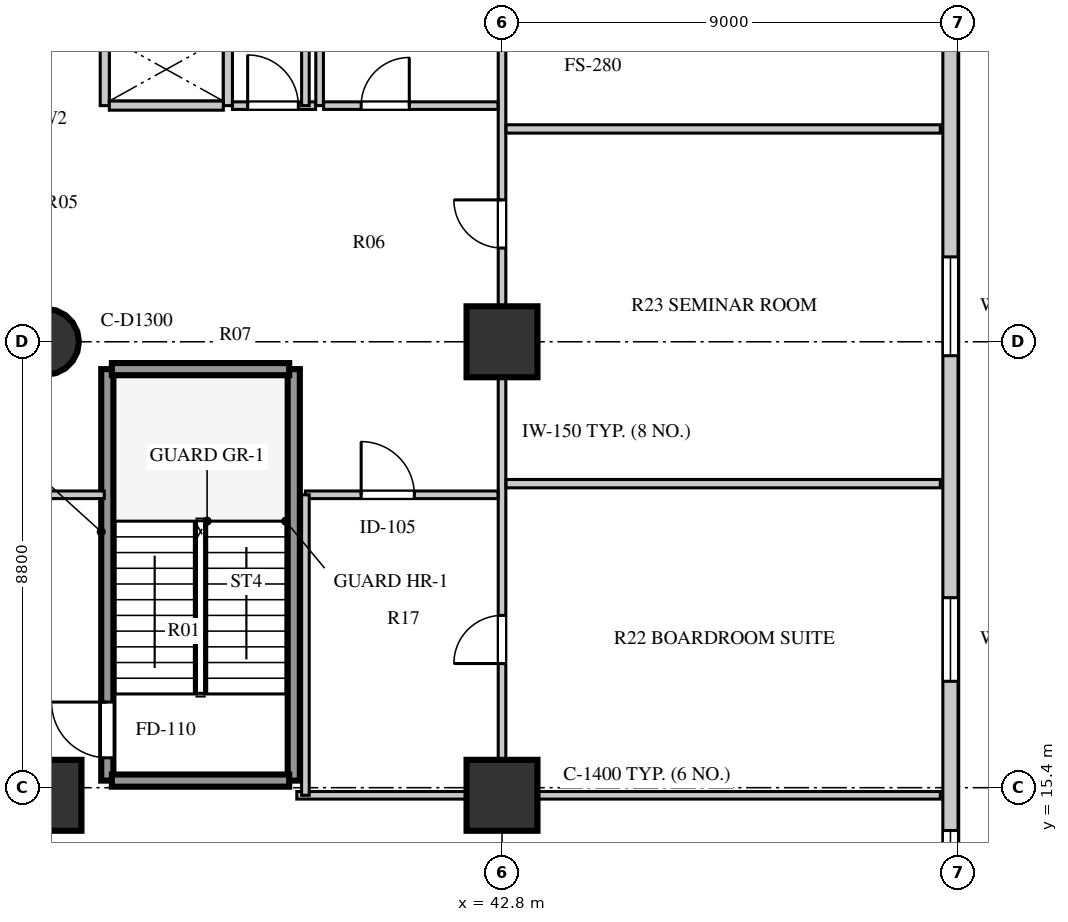
"""IFC4 building model, lengths in metres.
Left out: names, types, materials, properties, quantities, classifications, styles, units other than length and angle.
Written with IfcOpenShell. Run it as: python <this file> out.ifc"""

import sys

from ifc_helpers import new_model, si_unit, direction, frame, frame_2d, origin, origin_2d, place, context, subcontext, project, spatial, rectangle, circle, extrude, element, fill, save


model = new_model("IFC4")
c1 = context("Model", 3, precision=1e-05, world=origin(), true_north=direction((0.0, 1.0)))
c2 = subcontext(c1, "Body", "Model", "MODEL_VIEW")
j1 = project(units=[si_unit("LENGTHUNIT", "METRE"), si_unit("PLANEANGLEUNIT", "RADIAN")], contexts=[c1])
p1 = place(None, origin())
s1 = spatial("IfcSite", under=j1, at=p1, CompositionType="ELEMENT")
p2 = place(p1, origin())
s2 = spatial("IfcBuilding", under=s1, at=p2, CompositionType="ELEMENT")
p3 = place(p2, frame((0.0, 0.0, 17.0)))
s3 = spatial("IfcBuildingStorey", under=s2, at=p3, CompositionType="ELEMENT", Elevation=17.0)
p4 = place(p3, frame((33.8, 15.25, 0.0), z_axis=(0.0, 0.0, 1.0), x_axis=(1.0, 0.0, 0.0)))
e1 = element("IfcColumn", 1, at=p4, inside=s3, PredefinedType="COLUMN", context=c2, shape_type="SweptSolid", body=[
    extrude(rectangle(XDim=1.4, YDim=1.4, at=origin_2d()), origin(), (0.0, 0.0, 1.0), 4.22),
])
p5 = place(p3, frame((33.8, 24.2, 0.0), z_axis=(0.0, 0.0, 1.0), x_axis=(1.0, 0.0, 0.0)))
e2 = element("IfcColumn", 2, at=p5, inside=s3, PredefinedType="COLUMN", context=c2, shape_type="SweptSolid", body=[
    extrude(circle(Radius=0.65, at=origin_2d()), origin(), (0.0, 0.0, 1.0), 4.22),
])
for number, where, z_axis, x_axis in (
    (3, (42.8, 15.25, 0.0), (0.0, 0.0, 1.0), (1.0, 0.0, 0.0)),
    (4, (42.8, 24.2, 0.0), (0.0, 0.0, 1.0), (1.0, 0.0, 0.0)),
):
    element("IfcColumn", number, at=place(p3, frame(where, z_axis=z_axis, x_axis=x_axis)), inside=s3, PredefinedType="COLUMN", context=c2, shape_type="SweptSolid", body=[
        extrude(rectangle(XDim=1.4, YDim=1.4, at=origin_2d()), origin(), (0.0, 0.0, 1.0), 4.22),
    ])
p6 = place(p3, frame((51.65, 12.4, 0.0), z_axis=(0.0, 0.0, 1.0), x_axis=(0.0, 1.0, 0.0)))
e5 = element("IfcWall", 5, at=p6, inside=s3, PredefinedType="STANDARD", context=c2, shape_type="SweptSolid", body=[
    extrude(rectangle(XDim=32.4, YDim=0.3, at=frame_2d((16.2, 0.0))), origin(), (0.0, 0.0, 1.0), 4.22),
])
p7 = place(p6, frame((0.805, 0.0, 0.8)))
e6 = element("IfcOpeningElement", 6, at=p7, cuts=e5, PredefinedType="OPENING", context=c2, shape_type="SweptSolid", body=[
    extrude(rectangle(XDim=1.35, YDim=1.9, at=frame_2d((0.675, 0.95))), frame((0.0, 0.16, 0.0), z_axis=(0.0, -1.0, 0.0), x_axis=(1.0, 0.0, 0.0)), (0.0, 0.0, 1.0), 0.32),
])
p8 = place(p6, frame((5.1, 0.0, 0.8)))
e7 = element("IfcOpeningElement", 7, at=p8, cuts=e5, PredefinedType="OPENING", context=c2, shape_type="SweptSolid", body=[
    extrude(rectangle(XDim=1.65, YDim=1.95, at=frame_2d((0.825, 0.975))), frame((0.0, 0.16, 0.0), z_axis=(0.0, -1.0, 0.0), x_axis=(1.0, 0.0, 0.0)), (0.0, 0.0, 1.0), 0.32),
])
p9 = place(p6, frame((11.525, 0.0, 0.8)))
e8 = element("IfcOpeningElement", 8, at=p9, cuts=e5, PredefinedType="OPENING", context=c2, shape_type="SweptSolid", body=[
    extrude(rectangle(XDim=1.95, YDim=2.0, at=frame_2d((0.975, 1.0))), frame((0.0, 0.16, 0.0), z_axis=(0.0, -1.0, 0.0), x_axis=(1.0, 0.0, 0.0)), (0.0, 0.0, 1.0), 0.32),
])
p10 = place(p6, frame((18.225, 0.0, 0.8)))
e9 = element("IfcOpeningElement", 9, at=p10, cuts=e5, PredefinedType="OPENING", context=c2, shape_type="SweptSolid", body=[
    extrude(rectangle(XDim=2.25, YDim=2.0, at=frame_2d((1.125, 1.0))), frame((0.0, 0.16, 0.0), z_axis=(0.0, -1.0, 0.0), x_axis=(1.0, 0.0, 0.0)), (0.0, 0.0, 1.0), 0.32),
])
p11 = place(p6, frame((23.55, 0.0, 0.8)))
e10 = element("IfcOpeningElement", 10, at=p11, cuts=e5, PredefinedType="OPENING", context=c2, shape_type="SweptSolid", body=[
    extrude(rectangle(XDim=1.8, YDim=2.0, at=frame_2d((0.9, 1.0))), frame((0.0, 0.16, 0.0), z_axis=(0.0, -1.0, 0.0), x_axis=(1.0, 0.0, 0.0)), (0.0, 0.0, 1.0), 0.32),
])
p12 = place(p6, frame((27.125, 0.0, 0.8)))
e11 = element("IfcOpeningElement", 11, at=p12, cuts=e5, PredefinedType="OPENING", context=c2, shape_type="SweptSolid", body=[
    extrude(rectangle(XDim=1.5, YDim=2.0, at=frame_2d((0.75, 1.0))), frame((0.0, 0.16, 0.0), z_axis=(0.0, -1.0, 0.0), x_axis=(1.0, 0.0, 0.0)), (0.0, 0.0, 1.0), 0.32),
])
p13 = place(p6, frame((30.32, 0.0, 0.8)))
e12 = element("IfcOpeningElement", 12, at=p13, cuts=e5, PredefinedType="OPENING", context=c2, shape_type="SweptSolid", body=[
    extrude(rectangle(XDim=1.2, YDim=1.75, at=frame_2d((0.6, 0.875))), frame((0.0, 0.16, 0.0), z_axis=(0.0, -1.0, 0.0), x_axis=(1.0, 0.0, 0.0)), (0.0, 0.0, 1.0), 0.32),
])
p14 = place(p3, frame((34.96, 28.86, 0.0), z_axis=(0.0, 0.0, 1.0), x_axis=(0.0, 1.0, 0.0)))
e13 = element("IfcWall", 13, at=p14, inside=s3, PredefinedType="SOLIDWALL", context=c2, shape_type="SweptSolid", body=[
    extrude(rectangle(XDim=4.22, YDim=0.18, at=frame_2d((2.11, 0.0))), origin(), (0.0, 0.0, 1.0), 4.22),
])
p15 = place(p3, frame((37.39, 28.86, 0.0), z_axis=(0.0, 0.0, 1.0), x_axis=(0.0, 1.0, 0.0)))
e14 = element("IfcWall", 14, at=p15, inside=s3, PredefinedType="SOLIDWALL", context=c2, shape_type="SweptSolid", body=[
    extrude(rectangle(XDim=4.22, YDim=0.18, at=frame_2d((2.11, 0.0))), origin(), (0.0, 0.0, 1.0), 4.22),
])
p16 = place(p15, frame((2.1, 0.0, 0.0)))
e15 = element("IfcOpeningElement", 15, at=p16, cuts=e14, PredefinedType="OPENING", context=c2, shape_type="SweptSolid", body=[
    extrude(rectangle(XDim=1.2, YDim=2.12, at=frame_2d((0.6, 1.06))), frame((0.0, 0.1, 0.0), z_axis=(0.0, -1.0, 0.0), x_axis=(1.0, 0.0, 0.0)), (0.0, 0.0, 1.0), 0.2),
])
p17 = place(p3, frame((35.05, 28.86, 0.0), z_axis=(0.0, 0.0, 1.0), x_axis=(1.0, 0.0, 0.0)))
e16 = element("IfcWall", 16, at=p17, inside=s3, PredefinedType="SOLIDWALL", context=c2, shape_type="SweptSolid", body=[
    extrude(rectangle(XDim=2.25, YDim=0.18, at=frame_2d((1.125, 0.0))), origin(), (0.0, 0.0, 1.0), 4.22),
])
p18 = place(p3, frame((39.2, 28.86, 0.0), z_axis=(0.0, 0.0, 1.0), x_axis=(0.0, 1.0, 0.0)))
e17 = element("IfcWall", 17, at=p18, inside=s3, PredefinedType="PARTITIONING", context=c2, shape_type="SweptSolid", body=[
    extrude(rectangle(XDim=4.22, YDim=0.15, at=frame_2d((2.11, 0.0))), origin(), (0.0, 0.0, 1.0), 4.22),
])
p19 = place(p3, frame((37.48, 28.86, 0.0), z_axis=(0.0, 0.0, 1.0), x_axis=(1.0, 0.0, 0.0)))
e18 = element("IfcWall", 18, at=p19, inside=s3, PredefinedType="PARTITIONING", context=c2, shape_type="SweptSolid", body=[
    extrude(rectangle(XDim=1.64, YDim=0.15, at=frame_2d((0.82, 0.0))), origin(), (0.0, 0.0, 1.0), 4.22),
])
p20 = place(p19, frame((0.3, 0.0, 0.0)))
e19 = element("IfcOpeningElement", 19, at=p20, cuts=e18, PredefinedType="OPENING", context=c2, shape_type="SweptSolid", body=[
    extrude(rectangle(XDim=1.0, YDim=2.1, at=frame_2d((0.5, 1.05))), frame((0.0, 0.085, 0.0), z_axis=(0.0, -1.0, 0.0), x_axis=(1.0, 0.0, 0.0)), (0.0, 0.0, 1.0), 0.17),
])
p21 = place(p3, frame((35.01, 15.54, 0.0), z_axis=(0.0, 0.0, 1.0), x_axis=(0.0, 1.0, 0.0)))
e20 = element("IfcWall", 20, at=p21, inside=s3, PredefinedType="SHEAR", context=c2, shape_type="SweptSolid", body=[
    extrude(rectangle(XDim=8.12, YDim=0.24, at=frame_2d((4.06, 0.0))), origin(), (0.0, 0.0, 1.0), 4.5),
])
p22 = place(p21, frame((0.45, 0.0, 0.0)))
e21 = element("IfcOpeningElement", 21, at=p22, cuts=e20, PredefinedType="OPENING", context=c2, shape_type="SweptSolid", body=[
    extrude(rectangle(XDim=1.1, YDim=2.1, at=frame_2d((0.55, 1.05))), frame((0.0, 0.13, 0.0), z_axis=(0.0, -1.0, 0.0), x_axis=(1.0, 0.0, 0.0)), (0.0, 0.0, 1.0), 0.26),
])
p23 = place(p3, frame((38.69, 15.54, 0.0), z_axis=(0.0, 0.0, 1.0), x_axis=(0.0, 1.0, 0.0)))
e22 = element("IfcWall", 22, at=p23, inside=s3, PredefinedType="SHEAR", context=c2, shape_type="SweptSolid", body=[
    extrude(rectangle(XDim=8.12, YDim=0.24, at=frame_2d((4.06, 0.0))), origin(), (0.0, 0.0, 1.0), 4.5),
])
for number, where, z_axis, x_axis in (
    (23, (35.1, 15.54, 0.0), (0.0, 0.0, 1.0), (1.0, 0.0, 0.0)),
    (24, (35.1, 23.66, 0.0), (0.0, 0.0, 1.0), (1.0, 0.0, 0.0)),
):
    element("IfcWall", number, at=place(p3, frame(where, z_axis=z_axis, x_axis=x_axis)), inside=s3, PredefinedType="SHEAR", context=c2, shape_type="SweptSolid", body=[
        extrude(rectangle(XDim=3.5, YDim=0.24, at=frame_2d((1.75, 0.0))), origin(), (0.0, 0.0, 1.0), 4.5),
    ])
p24 = place(p3, frame((27.5, 21.18, 0.0), z_axis=(0.0, 0.0, 1.0), x_axis=(1.0, 0.0, 0.0)))
e25 = element("IfcWall", 25, at=p24, inside=s3, PredefinedType="PARTITIONING", context=c2, shape_type="SweptSolid", body=[
    extrude(rectangle(XDim=7.45, YDim=0.15, at=frame_2d((3.725, 0.0))), origin(), (0.0, 0.0, 1.0), 3.82),
])
p25 = place(p24, frame((5.1, 0.0, 0.0)))
e26 = element("IfcOpeningElement", 26, at=p25, cuts=e25, PredefinedType="OPENING", context=c2, shape_type="SweptSolid", body=[
    extrude(rectangle(XDim=0.95, YDim=2.08, at=frame_2d((0.475, 1.04))), frame((0.0, 0.085, 0.0), z_axis=(0.0, -1.0, 0.0), x_axis=(1.0, 0.0, 0.0)), (0.0, 0.0, 1.0), 0.17),
])
p26 = place(p24, frame((2.3, 0.0, 0.0)))
e27 = element("IfcOpeningElement", 27, at=p26, cuts=e25, PredefinedType="OPENING", context=c2, shape_type="SweptSolid", body=[
    extrude(rectangle(XDim=1.35, YDim=2.1, at=frame_2d((0.675, 1.05))), frame((0.0, 0.085, 0.0), z_axis=(0.0, -1.0, 0.0), x_axis=(1.0, 0.0, 0.0)), (0.0, 0.0, 1.0), 0.17),
])
p27 = place(p3, frame((42.8, 15.25, 0.0), z_axis=(0.0, 0.0, 1.0), x_axis=(0.0, 1.0, 0.0)))
e28 = element("IfcWall", 28, at=p27, inside=s3, PredefinedType="PARTITIONING", context=c2, shape_type="SweptSolid", body=[
    extrude(rectangle(XDim=26.7, YDim=0.15, at=frame_2d((13.35, 0.0))), origin(), (0.0, 0.0, 1.0), 3.42),
])
p28 = place(p27, frame((2.6, 0.0, 0.0)))
e29 = element("IfcOpeningElement", 29, at=p28, cuts=e28, PredefinedType="OPENING", context=c2, shape_type="SweptSolid", body=[
    extrude(rectangle(XDim=0.95, YDim=2.08, at=frame_2d((0.475, 1.04))), frame((0.0, 0.085, 0.0), z_axis=(0.0, -1.0, 0.0), x_axis=(1.0, 0.0, 0.0)), (0.0, 0.0, 1.0), 0.17),
])
p29 = place(p27, frame((10.8, 0.0, 0.0)))
e30 = element("IfcOpeningElement", 30, at=p29, cuts=e28, PredefinedType="OPENING", context=c2, shape_type="SweptSolid", body=[
    extrude(rectangle(XDim=0.95, YDim=2.08, at=frame_2d((0.475, 1.04))), frame((0.0, 0.085, 0.0), z_axis=(0.0, -1.0, 0.0), x_axis=(1.0, 0.0, 0.0)), (0.0, 0.0, 1.0), 0.17),
])
p30 = place(p27, frame((15.7, 0.0, 0.0)))
e31 = element("IfcOpeningElement", 31, at=p30, cuts=e28, PredefinedType="OPENING", context=c2, shape_type="SweptSolid", body=[
    extrude(rectangle(XDim=1.1, YDim=2.12, at=frame_2d((0.55, 1.06))), frame((0.0, 0.085, 0.0), z_axis=(0.0, -1.0, 0.0), x_axis=(1.0, 0.0, 0.0)), (0.0, 0.0, 1.0), 0.17),
])
p31 = place(p27, frame((20.6, 0.0, 0.0)))
e32 = element("IfcOpeningElement", 32, at=p31, cuts=e28, PredefinedType="OPENING", context=c2, shape_type="SweptSolid", body=[
    extrude(rectangle(XDim=0.9, YDim=2.05, at=frame_2d((0.45, 1.025))), frame((0.0, 0.085, 0.0), z_axis=(0.0, -1.0, 0.0), x_axis=(1.0, 0.0, 0.0)), (0.0, 0.0, 1.0), 0.17),
])
p32 = place(p27, frame((24.1, 0.0, 0.0)))
e33 = element("IfcOpeningElement", 33, at=p32, cuts=e28, PredefinedType="OPENING", context=c2, shape_type="SweptSolid", body=[
    extrude(rectangle(XDim=0.95, YDim=2.05, at=frame_2d((0.475, 1.025))), frame((0.0, 0.085, 0.0), z_axis=(0.0, -1.0, 0.0), x_axis=(1.0, 0.0, 0.0)), (0.0, 0.0, 1.0), 0.17),
])
p33 = place(p3, frame((38.75, 15.25, 0.0), z_axis=(0.0, 0.0, 1.0), x_axis=(1.0, 0.0, 0.0)))
e34 = element("IfcWall", 34, at=p33, inside=s3, PredefinedType="PARTITIONING", context=c2, shape_type="SweptSolid", body=[
    extrude(rectangle(XDim=12.7, YDim=0.15, at=frame_2d((6.35, 0.0))), origin(), (0.0, 0.0, 1.0), 3.42),
])
p34 = place(p3, frame((38.92, 21.18, 0.0), z_axis=(0.0, 0.0, 1.0), x_axis=(1.0, 0.0, 0.0)))
e35 = element("IfcWall", 35, at=p34, inside=s3, PredefinedType="PARTITIONING", context=c2, shape_type="SweptSolid", body=[
    extrude(rectangle(XDim=3.8, YDim=0.15, at=frame_2d((1.9, 0.0))), origin(), (0.0, 0.0, 1.0), 4.22),
])
p35 = place(p34, frame((1.1, 0.0, 0.0)))
e36 = element("IfcOpeningElement", 36, at=p35, cuts=e35, PredefinedType="OPENING", context=c2, shape_type="SweptSolid", body=[
    extrude(rectangle(XDim=1.05, YDim=2.1, at=frame_2d((0.525, 1.05))), frame((0.0, 0.085, 0.0), z_axis=(0.0, -1.0, 0.0), x_axis=(1.0, 0.0, 0.0)), (0.0, 0.0, 1.0), 0.17),
])
p36 = place(p3, frame((38.92, 15.25, 0.0), z_axis=(0.0, 0.0, 1.0), x_axis=(0.0, 1.0, 0.0)))
e37 = element("IfcWall", 37, at=p36, inside=s3, PredefinedType="PARTITIONING", context=c2, shape_type="SweptSolid", body=[
    extrude(rectangle(XDim=5.93, YDim=0.15, at=frame_2d((2.965, 0.0))), origin(), (0.0, 0.0, 1.0), 4.22),
])
p37 = place(p3, frame((39.28, 28.86, 0.0), z_axis=(0.0, 0.0, 1.0), x_axis=(1.0, 0.0, 0.0)))
e38 = element("IfcWall", 38, at=p37, inside=s3, PredefinedType="PARTITIONING", context=c2, shape_type="SweptSolid", body=[
    extrude(rectangle(XDim=3.44, YDim=0.15, at=frame_2d((1.72, 0.0))), origin(), (0.0, 0.0, 1.0), 4.22),
])
p38 = place(p37, frame((0.74, 0.0, 0.0)))
e39 = element("IfcOpeningElement", 39, at=p38, cuts=e38, PredefinedType="OPENING", context=c2, shape_type="SweptSolid", body=[
    extrude(rectangle(XDim=0.95, YDim=2.08, at=frame_2d((0.475, 1.04))), frame((0.0, 0.085, 0.0), z_axis=(0.0, -1.0, 0.0), x_axis=(1.0, 0.0, 0.0)), (0.0, 0.0, 1.0), 0.17),
])
p39 = place(p3, frame((38.92, 28.86, 0.0), z_axis=(0.0, 0.0, 1.0), x_axis=(0.0, 1.0, 0.0)))
e40 = element("IfcWall", 40, at=p39, inside=s3, PredefinedType="PARTITIONING", context=c2, shape_type="SweptSolid", body=[
    extrude(rectangle(XDim=13.09, YDim=0.15, at=frame_2d((6.545, 0.0))), origin(), (0.0, 0.0, 1.0), 4.22),
])
for number, where, z_axis, x_axis in (
    (41, (42.88, 21.4, 0.0), (0.0, 0.0, 1.0), (1.0, 0.0, 0.0)),
    (42, (42.88, 28.4, 0.0), (0.0, 0.0, 1.0), (1.0, 0.0, 0.0)),
):
    element("IfcWall", number, at=place(p3, frame(where, z_axis=z_axis, x_axis=x_axis)), inside=s3, PredefinedType="PARTITIONING", context=c2, shape_type="SweptSolid", body=[
        extrude(rectangle(XDim=8.57, YDim=0.165, at=frame_2d((4.285, 0.0))), origin(), (0.0, 0.0, 1.0), 4.22),
    ])
p40 = place(p7, origin())
e43 = element("IfcWindow", 43, at=p40, inside=s3, PartitioningType="SINGLE_PANEL", PredefinedType="WINDOW", context=c2, shape_type="SweptSolid", body=[
    extrude(rectangle(XDim=1.35, YDim=1.9, at=frame_2d((0.675, 0.95))), frame((0.0, 0.03, 0.0), z_axis=(0.0, -1.0, 0.0), x_axis=(1.0, 0.0, 0.0)), (0.0, 0.0, 1.0), 0.06),
])
fill(e6, e43)
p41 = place(p8, origin())
e44 = element("IfcWindow", 44, at=p41, inside=s3, PartitioningType="SINGLE_PANEL", PredefinedType="WINDOW", context=c2, shape_type="SweptSolid", body=[
    extrude(rectangle(XDim=1.65, YDim=1.95, at=frame_2d((0.825, 0.975))), frame((0.0, 0.03, 0.0), z_axis=(0.0, -1.0, 0.0), x_axis=(1.0, 0.0, 0.0)), (0.0, 0.0, 1.0), 0.06),
])
fill(e7, e44)
p42 = place(p9, origin())
e45 = element("IfcWindow", 45, at=p42, inside=s3, PartitioningType="SINGLE_PANEL", PredefinedType="WINDOW", context=c2, shape_type="SweptSolid", body=[
    extrude(rectangle(XDim=1.95, YDim=2.0, at=frame_2d((0.975, 1.0))), frame((0.0, 0.03, 0.0), z_axis=(0.0, -1.0, 0.0), x_axis=(1.0, 0.0, 0.0)), (0.0, 0.0, 1.0), 0.06),
])
fill(e8, e45)
p43 = place(p20, origin())
e46 = element("IfcDoor", 46, at=p43, inside=s3, OperationType="SINGLE_SWING_LEFT", PredefinedType="DOOR", context=c2, shape_type="SweptSolid", body=[
    extrude(rectangle(XDim=1.0, YDim=2.1, at=frame_2d((0.5, 1.05))), frame((0.0, 0.025, 0.0), z_axis=(0.0, -1.0, 0.0), x_axis=(1.0, 0.0, 0.0)), (0.0, 0.0, 1.0), 0.05),
])
fill(e19, e46)
p44 = place(p22, origin())
e47 = element("IfcDoor", 47, at=p44, inside=s3, OperationType="SINGLE_SWING_RIGHT", PredefinedType="DOOR", context=c2, shape_type="SweptSolid", body=[
    extrude(rectangle(XDim=1.1, YDim=2.1, at=frame_2d((0.55, 1.05))), frame((0.0, 0.025, 0.0), z_axis=(0.0, -1.0, 0.0), x_axis=(1.0, 0.0, 0.0)), (0.0, 0.0, 1.0), 0.05),
])
fill(e21, e47)
p45 = place(p35, origin())
e48 = element("IfcDoor", 48, at=p45, inside=s3, OperationType="SINGLE_SWING_LEFT", PredefinedType="DOOR", context=c2, shape_type="SweptSolid", body=[
    extrude(rectangle(XDim=1.05, YDim=2.1, at=frame_2d((0.525, 1.05))), frame((0.0, 0.025, 0.0), z_axis=(0.0, -1.0, 0.0), x_axis=(1.0, 0.0, 0.0)), (0.0, 0.0, 1.0), 0.05),
])
fill(e36, e48)
p46 = place(p38, frame((0.95, 0.0, 0.0), z_axis=(0.0, 0.0, 1.0), x_axis=(-1.0, 0.0, 0.0)))
e49 = element("IfcDoor", 49, at=p46, inside=s3, OperationType="SINGLE_SWING_LEFT", PredefinedType="DOOR", context=c2, shape_type="SweptSolid", body=[
    extrude(rectangle(XDim=0.95, YDim=2.08, at=frame_2d((0.475, 1.04))), frame((0.0, 0.025, 0.0), z_axis=(0.0, -1.0, 0.0), x_axis=(1.0, 0.0, 0.0)), (0.0, 0.0, 1.0), 0.05),
])
fill(e39, e49)
p47 = place(p28, origin())
e50 = element("IfcDoor", 50, at=p47, inside=s3, OperationType="SINGLE_SWING_LEFT", PredefinedType="DOOR", context=c2, shape_type="SweptSolid", body=[
    extrude(rectangle(XDim=0.95, YDim=2.08, at=frame_2d((0.475, 1.04))), frame((0.0, 0.025, 0.0), z_axis=(0.0, -1.0, 0.0), x_axis=(1.0, 0.0, 0.0)), (0.0, 0.0, 1.0), 0.05),
])
fill(e29, e50)
p48 = place(p29, origin())
e51 = element("IfcDoor", 51, at=p48, inside=s3, OperationType="SINGLE_SWING_RIGHT", PredefinedType="DOOR", context=c2, shape_type="SweptSolid", body=[
    extrude(rectangle(XDim=0.95, YDim=2.08, at=frame_2d((0.475, 1.04))), frame((0.0, 0.025, 0.0), z_axis=(0.0, -1.0, 0.0), x_axis=(1.0, 0.0, 0.0)), (0.0, 0.0, 1.0), 0.05),
])
fill(e30, e51)
save(model, sys.argv[1])
